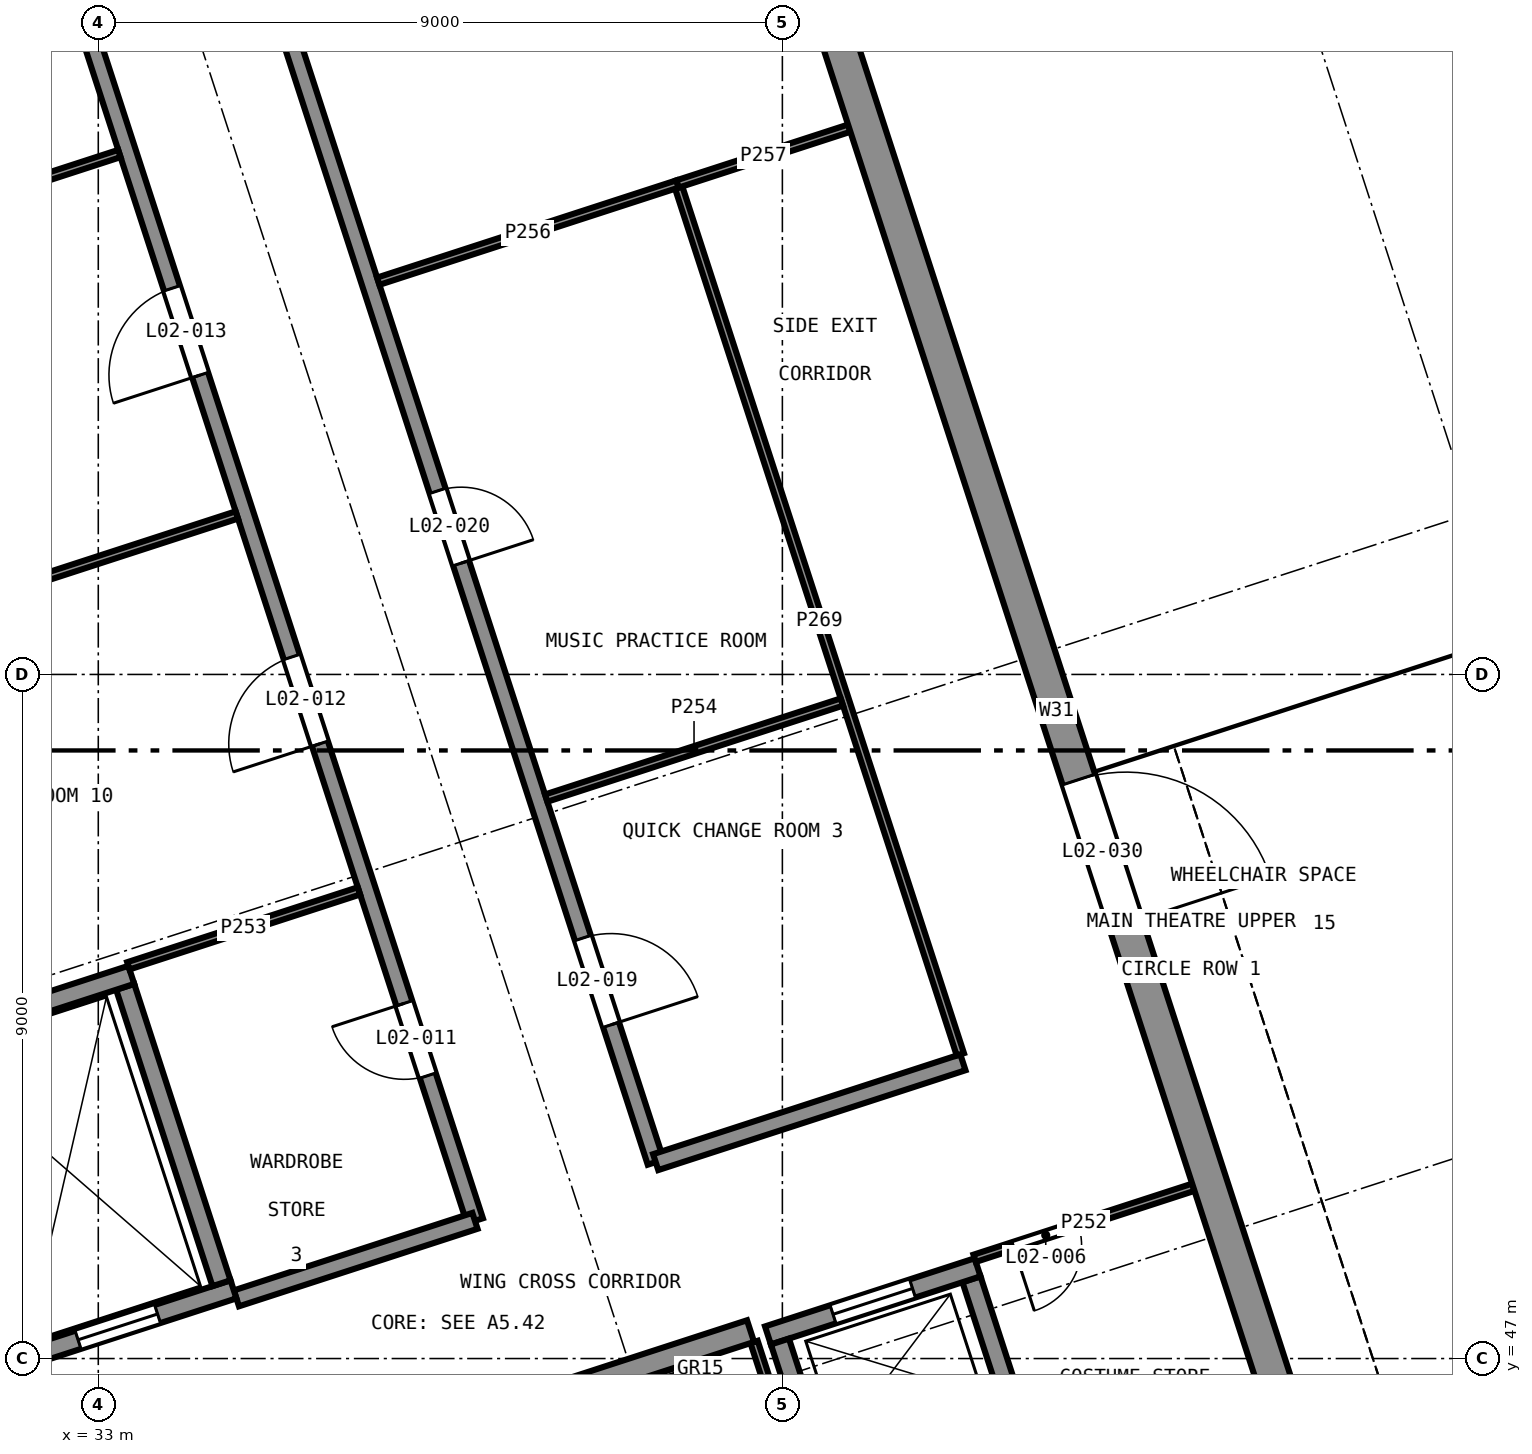
"""IFC4 building model, lengths in metres.
Left out: names, types, materials, properties, quantities, classifications, styles, units other than length and angle.
Written with IfcOpenShell. Run it as: python <this file> out.ifc"""

import sys

from ifc_helpers import new_model, si_unit, direction, frame, frame_2d, origin, place, context, subcontext, project, spatial, rectangle, extrude, element, fill, save


model = new_model("IFC4")
c1 = context("Model", 3, precision=1e-05, world=origin(), true_north=direction((0.0, 1.0)))
c2 = subcontext(c1, "Body", "Model", "MODEL_VIEW")
j1 = project(units=[si_unit("LENGTHUNIT", "METRE"), si_unit("PLANEANGLEUNIT", "RADIAN")], contexts=[c1])
p1 = place(None, origin())
s1 = spatial("IfcSite", under=j1, at=p1, CompositionType="ELEMENT")
p2 = place(p1, origin())
s2 = spatial("IfcBuilding", under=s1, at=p2, CompositionType="ELEMENT")
p3 = place(p2, frame((0.0, 0.0, 9.5)))
s3 = spatial("IfcBuildingStorey", under=s2, at=p3, CompositionType="ELEMENT", Elevation=9.5)
p4 = place(p3, frame((49.786, 41.93, 0.0), z_axis=(0.0, 0.0, 1.0), x_axis=(0.951055937194, 0.309018776661, 0.0)))
e1 = element("IfcWall", 1, at=p4, inside=s3, PredefinedType="SHEAR", context=c2, shape_type="SweptSolid", body=[
    extrude(rectangle(XDim=29.45, YDim=0.45, at=frame_2d((14.725, 0.0))), origin(), (0.0, 0.0, 1.0), 4.0),
])
p5 = place(p3, frame((49.93, 42.214, 0.0), z_axis=(0.0, 0.0, 1.0), x_axis=(-0.309016215614, 0.95105676933, 0.0)))
e2 = element("IfcWall", 2, at=p5, inside=s3, PredefinedType="SHEAR", context=c2, shape_type="SweptSolid", body=[
    extrude(rectangle(XDim=27.975, YDim=0.45, at=frame_2d((13.988, 0.0))), origin(), (0.0, 0.0, 1.0), 4.0),
])
p6 = place(p5, frame((11.042, 0.0, 0.0)))
e3 = element("IfcOpeningElement", 3, at=p6, cuts=e2, PredefinedType="OPENING", context=c2, shape_type="SweptSolid", body=[
    extrude(rectangle(XDim=2.0, YDim=2.4, at=frame_2d((1.0, 1.2))), frame((0.0, 0.235, 0.0), z_axis=(0.0, -1.0, 0.0), x_axis=(1.0, 0.0, 0.0)), (0.0, 0.0, 1.0), 0.47),
])
p7 = place(p3, frame((33.501, 41.003, 0.0), z_axis=(0.0, 0.0, 1.0), x_axis=(-0.309017194826, 0.951056451165, 0.0)))
e4 = element("IfcWall", 4, at=p7, inside=s3, PredefinedType="SOLIDWALL", context=c2, shape_type="SweptSolid", body=[
    extrude(rectangle(XDim=53.7, YDim=0.3, at=frame_2d((26.85, 0.0))), origin(), (0.0, 0.0, 1.0), 4.0),
])
p8 = place(p7, frame((21.55, 0.0, 0.9)))
e5 = element("IfcOpeningElement", 5, at=p8, cuts=e4, PredefinedType="OPENING", context=c2, shape_type="SweptSolid", body=[
    extrude(rectangle(XDim=3.6, YDim=2.1, at=frame_2d((1.8, 1.05))), frame((0.0, 0.16, 0.0), z_axis=(0.0, -1.0, 0.0), x_axis=(1.0, 0.0, 0.0)), (0.0, 0.0, 1.0), 0.32),
])
p9 = place(p3, frame((41.581, 47.361, 0.0), z_axis=(0.0, 0.0, 1.0), x_axis=(-0.951058929949, -0.309009565815, 0.0)))
e6 = element("IfcWall", 6, at=p9, inside=s3, PredefinedType="SOLIDWALL", context=c2, shape_type="SweptSolid", body=[
    extrude(rectangle(XDim=6.35, YDim=0.3, at=frame_2d((3.175, 0.0))), origin(), (0.0, 0.0, 1.0), 3.7),
])
p10 = place(p9, frame((4.85, 0.0, 0.0)))
e7 = element("IfcOpeningElement", 7, at=p10, cuts=e6, PredefinedType="OPENING", context=c2, shape_type="SweptSolid", body=[
    extrude(rectangle(XDim=1.0, YDim=2.1, at=frame_2d((0.5, 1.05))), frame((0.0, 0.16, 0.0), z_axis=(0.0, -1.0, 0.0), x_axis=(1.0, 0.0, 0.0)), (0.0, 0.0, 1.0), 0.32),
])
p11 = place(p3, frame((44.982, 46.521, 0.0), z_axis=(0.0, 0.0, 1.0), x_axis=(-0.308986014439, 0.951066581729, 0.0)))
e8 = element("IfcWall", 8, at=p11, inside=s3, PredefinedType="SHEAR", context=c2, shape_type="SweptSolid", body=[
    extrude(rectangle(XDim=1.6, YDim=0.25, at=frame_2d((0.8, 0.0))), origin(), (0.0, 0.0, 1.0), 4.0),
])
p12 = place(p3, frame((44.568, 48.2, 0.0), z_axis=(0.0, 0.0, 1.0), x_axis=(-0.951047059821, -0.309046096893, 0.0)))
e9 = element("IfcWall", 9, at=p12, inside=s3, PredefinedType="SHEAR", context=c2, shape_type="SweptSolid", body=[
    extrude(rectangle(XDim=2.9, YDim=0.25, at=frame_2d((1.45, 0.0))), origin(), (0.0, 0.0, 1.0), 4.0),
])
p13 = place(p12, frame((0.9, 0.0, 0.0)))
e10 = element("IfcOpeningElement", 10, at=p13, cuts=e9, PredefinedType="OPENING", context=c2, shape_type="SweptSolid", body=[
    extrude(rectangle(XDim=1.1, YDim=2.1, at=frame_2d((0.55, 1.05))), frame((0.0, 0.135, 0.0), z_axis=(0.0, -1.0, 0.0), x_axis=(1.0, 0.0, 0.0)), (0.0, 0.0, 1.0), 0.27),
])
p14 = place(p3, frame((41.968, 47.224, 0.0), z_axis=(0.0, 0.0, 1.0), x_axis=(0.308986014439, -0.951066581729, 0.0)))
e11 = element("IfcWall", 11, at=p14, inside=s3, PredefinedType="SHEAR", context=c2, shape_type="SweptSolid", body=[
    extrude(rectangle(XDim=1.6, YDim=0.25, at=frame_2d((0.8, 0.0))), origin(), (0.0, 0.0, 1.0), 4.0),
])
p15 = place(p3, frame((31.735, 46.922, 0.0), z_axis=(0.0, 0.0, 1.0), x_axis=(0.95104415986, 0.309055020985, 0.0)))
e12 = element("IfcWall", 12, at=p15, inside=s3, PredefinedType="SHEAR", context=c2, shape_type="SweptSolid", body=[
    extrude(rectangle(XDim=3.2, YDim=0.25, at=frame_2d((1.6, 0.0))), origin(), (0.0, 0.0, 1.0), 4.0),
])
p16 = place(p15, frame((1.05, 0.0, 0.0)))
e13 = element("IfcOpeningElement", 13, at=p16, cuts=e12, PredefinedType="OPENING", context=c2, shape_type="SweptSolid", body=[
    extrude(rectangle(XDim=1.1, YDim=2.1, at=frame_2d((0.55, 1.05))), frame((0.0, 0.135, 0.0), z_axis=(0.0, -1.0, 0.0), x_axis=(1.0, 0.0, 0.0)), (0.0, 0.0, 1.0), 0.27),
])
p17 = place(p3, frame((34.621, 47.991, 0.0), z_axis=(0.0, 0.0, 1.0), x_axis=(-0.309055103076, 0.951044133184, 0.0)))
e14 = element("IfcWall", 14, at=p17, inside=s3, PredefinedType="SHEAR", context=c2, shape_type="SweptSolid", body=[
    extrude(rectangle(XDim=4.1, YDim=0.25, at=frame_2d((2.05, 0.0))), origin(), (0.0, 0.0, 1.0), 4.0),
])
p18 = place(p3, frame((33.434, 52.048, 0.0), z_axis=(0.0, 0.0, 1.0), x_axis=(-0.951066581729, -0.308986014439, 0.0)))
e15 = element("IfcWall", 15, at=p18, inside=s3, PredefinedType="SHEAR", context=c2, shape_type="SweptSolid", body=[
    extrude(rectangle(XDim=3.2, YDim=0.25, at=frame_2d((1.6, 0.0))), origin(), (0.0, 0.0, 1.0), 4.0),
])
p19 = place(p3, frame((37.956, 48.812, 0.0), z_axis=(0.0, 0.0, 1.0), x_axis=(-0.30901736393, 0.951056396219, 0.0)))
e16 = element("IfcWall", 16, at=p19, inside=s3, PredefinedType="SOLIDWALL", context=c2, shape_type="SweptSolid", body=[
    extrude(rectangle(XDim=41.7, YDim=0.22, at=frame_2d((20.85, 0.0))), origin(), (0.0, 0.0, 1.0), 3.7),
])
p20 = place(p19, frame((2.009, 0.0, 0.0)))
e17 = element("IfcOpeningElement", 17, at=p20, cuts=e16, PredefinedType="OPENING", context=c2, shape_type="SweptSolid", body=[
    extrude(rectangle(XDim=1.0, YDim=2.1, at=frame_2d((0.5, 1.05))), frame((0.0, 0.12, 0.0), z_axis=(0.0, -1.0, 0.0), x_axis=(1.0, 0.0, 0.0)), (0.0, 0.0, 1.0), 0.24),
])
p21 = place(p19, frame((6.6, 0.0, 0.0)))
e18 = element("IfcOpeningElement", 18, at=p21, cuts=e16, PredefinedType="OPENING", context=c2, shape_type="SweptSolid", body=[
    extrude(rectangle(XDim=1.2, YDim=2.1, at=frame_2d((0.6, 1.05))), frame((0.0, 0.12, 0.0), z_axis=(0.0, -1.0, 0.0), x_axis=(1.0, 0.0, 0.0)), (0.0, 0.0, 1.0), 0.24),
])
p22 = place(p19, frame((11.7, 0.0, 0.0)))
e19 = element("IfcOpeningElement", 19, at=p22, cuts=e16, PredefinedType="OPENING", context=c2, shape_type="SweptSolid", body=[
    extrude(rectangle(XDim=1.2, YDim=2.1, at=frame_2d((0.6, 1.05))), frame((0.0, 0.12, 0.0), z_axis=(0.0, -1.0, 0.0), x_axis=(1.0, 0.0, 0.0)), (0.0, 0.0, 1.0), 0.24),
])
p23 = place(p19, frame((16.7, 0.0, 0.0)))
e20 = element("IfcOpeningElement", 20, at=p23, cuts=e16, PredefinedType="OPENING", context=c2, shape_type="SweptSolid", body=[
    extrude(rectangle(XDim=1.2, YDim=2.1, at=frame_2d((0.6, 1.05))), frame((0.0, 0.12, 0.0), z_axis=(0.0, -1.0, 0.0), x_axis=(1.0, 0.0, 0.0)), (0.0, 0.0, 1.0), 0.24),
])
p24 = place(p19, frame((21.7, 0.0, 0.0)))
e21 = element("IfcOpeningElement", 21, at=p24, cuts=e16, PredefinedType="OPENING", context=c2, shape_type="SweptSolid", body=[
    extrude(rectangle(XDim=1.2, YDim=2.1, at=frame_2d((0.6, 1.05))), frame((0.0, 0.12, 0.0), z_axis=(0.0, -1.0, 0.0), x_axis=(1.0, 0.0, 0.0)), (0.0, 0.0, 1.0), 0.24),
])
p25 = place(p19, frame((26.7, 0.0, 0.0)))
e22 = element("IfcOpeningElement", 22, at=p25, cuts=e16, PredefinedType="OPENING", context=c2, shape_type="SweptSolid", body=[
    extrude(rectangle(XDim=1.2, YDim=2.1, at=frame_2d((0.6, 1.05))), frame((0.0, 0.12, 0.0), z_axis=(0.0, -1.0, 0.0), x_axis=(1.0, 0.0, 0.0)), (0.0, 0.0, 1.0), 0.24),
])
p26 = place(p19, frame((31.739, 0.0, 0.0)))
e23 = element("IfcOpeningElement", 23, at=p26, cuts=e16, PredefinedType="OPENING", context=c2, shape_type="SweptSolid", body=[
    extrude(rectangle(XDim=1.2, YDim=2.1, at=frame_2d((0.6, 1.05))), frame((0.0, 0.12, 0.0), z_axis=(0.0, -1.0, 0.0), x_axis=(1.0, 0.0, 0.0)), (0.0, 0.0, 1.0), 0.24),
])
p27 = place(p3, frame((40.333, 49.584, 0.0), z_axis=(0.0, 0.0, 1.0), x_axis=(-0.309015643281, 0.951056955291, 0.0)))
e24 = element("IfcWall", 24, at=p27, inside=s3, PredefinedType="SOLIDWALL", context=c2, shape_type="SweptSolid", body=[
    extrude(rectangle(XDim=41.7, YDim=0.22, at=frame_2d((20.85, 0.0))), origin(), (0.0, 0.0, 1.0), 3.7),
])
p28 = place(p27, frame((1.9, 0.0, 0.0)))
e25 = element("IfcOpeningElement", 25, at=p28, cuts=e24, PredefinedType="OPENING", context=c2, shape_type="SweptSolid", body=[
    extrude(rectangle(XDim=1.2, YDim=2.1, at=frame_2d((0.6, 1.05))), frame((0.0, 0.12, 0.0), z_axis=(0.0, -1.0, 0.0), x_axis=(1.0, 0.0, 0.0)), (0.0, 0.0, 1.0), 0.24),
])
p29 = place(p27, frame((8.285, 0.0, 0.0)))
e26 = element("IfcOpeningElement", 26, at=p29, cuts=e24, PredefinedType="OPENING", context=c2, shape_type="SweptSolid", body=[
    extrude(rectangle(XDim=1.0, YDim=2.1, at=frame_2d((0.5, 1.05))), frame((0.0, 0.12, 0.0), z_axis=(0.0, -1.0, 0.0), x_axis=(1.0, 0.0, 0.0)), (0.0, 0.0, 1.0), 0.24),
])
p30 = place(p27, frame((16.475, 0.0, 0.0)))
e27 = element("IfcOpeningElement", 27, at=p30, cuts=e24, PredefinedType="OPENING", context=c2, shape_type="SweptSolid", body=[
    extrude(rectangle(XDim=1.0, YDim=2.1, at=frame_2d((0.5, 1.05))), frame((0.0, 0.12, 0.0), z_axis=(0.0, -1.0, 0.0), x_axis=(1.0, 0.0, 0.0)), (0.0, 0.0, 1.0), 0.24),
])
p31 = place(p27, frame((25.752, 0.0, 0.0)))
e28 = element("IfcOpeningElement", 28, at=p31, cuts=e24, PredefinedType="OPENING", context=c2, shape_type="SweptSolid", body=[
    extrude(rectangle(XDim=1.0, YDim=2.1, at=frame_2d((0.5, 1.05))), frame((0.0, 0.12, 0.0), z_axis=(0.0, -1.0, 0.0), x_axis=(1.0, 0.0, 0.0)), (0.0, 0.0, 1.0), 0.24),
])
p32 = place(p27, frame((32.761, 0.0, 0.0)))
e29 = element("IfcOpeningElement", 29, at=p32, cuts=e24, PredefinedType="OPENING", context=c2, shape_type="SweptSolid", body=[
    extrude(rectangle(XDim=1.0, YDim=2.1, at=frame_2d((0.5, 1.05))), frame((0.0, 0.12, 0.0), z_axis=(0.0, -1.0, 0.0), x_axis=(1.0, 0.0, 0.0)), (0.0, 0.0, 1.0), 0.24),
])
p33 = place(p3, frame((34.817, 47.792, 0.0), z_axis=(0.0, 0.0, 1.0), x_axis=(0.951053095941, 0.309027520945, 0.0)))
e30 = element("IfcWall", 30, at=p33, inside=s3, PredefinedType="SOLIDWALL", context=c2, shape_type="SweptSolid", body=[
    extrude(rectangle(XDim=3.3, YDim=0.22, at=frame_2d((1.65, 0.0))), origin(), (0.0, 0.0, 1.0), 3.7),
])
p34 = place(p3, frame((40.333, 49.584, 0.0), z_axis=(0.0, 0.0, 1.0), x_axis=(0.951062770994, 0.308997743729, 0.0)))
e31 = element("IfcWall", 31, at=p34, inside=s3, PredefinedType="SOLIDWALL", context=c2, shape_type="SweptSolid", body=[
    extrude(rectangle(XDim=4.25, YDim=0.22, at=frame_2d((2.125, 0.0))), origin(), (0.0, 0.0, 1.0), 3.7),
])
p35 = place(p3, frame((44.53, 48.319, 0.0), z_axis=(0.0, 0.0, 1.0), x_axis=(0.951053046121, 0.30902767427, 0.0)))
e32 = element("IfcWall", 32, at=p35, inside=s3, PredefinedType="PARTITIONING", context=c2, shape_type="SweptSolid", body=[
    extrude(rectangle(XDim=3.025, YDim=0.1, at=frame_2d((1.512, 0.0))), origin(), (0.0, 0.0, 1.0), 3.7),
])
p36 = place(p35, frame((0.533, 0.0, 0.0)))
e33 = element("IfcOpeningElement", 33, at=p36, cuts=e32, PredefinedType="OPENING", context=c2, shape_type="SweptSolid", body=[
    extrude(rectangle(XDim=0.9, YDim=2.1, at=frame_2d((0.45, 1.05))), frame((0.0, 0.06, 0.0), z_axis=(0.0, -1.0, 0.0), x_axis=(1.0, 0.0, 0.0)), (0.0, 0.0, 1.0), 0.12),
])
p37 = place(p3, frame((33.396, 52.167, 0.0), z_axis=(0.0, 0.0, 1.0), x_axis=(0.951044192343, 0.309054921027, 0.0)))
e34 = element("IfcWall", 34, at=p37, inside=s3, PredefinedType="PARTITIONING", context=c2, shape_type="SweptSolid", body=[
    extrude(rectangle(XDim=3.19, YDim=0.1, at=frame_2d((1.595, 0.0))), origin(), (0.0, 0.0, 1.0), 3.7),
])
p38 = place(p3, frame((38.893, 54.373, 0.0), z_axis=(0.0, 0.0, 1.0), x_axis=(0.951055560564, 0.309019935796, 0.0)))
e35 = element("IfcWall", 35, at=p38, inside=s3, PredefinedType="PARTITIONING", context=c2, shape_type="SweptSolid", body=[
    extrude(rectangle(XDim=4.09, YDim=0.1, at=frame_2d((2.045, 0.0))), origin(), (0.0, 0.0, 1.0), 3.7),
])
p39 = place(p3, frame((28.745, 56.123, 0.0), z_axis=(0.0, 0.0, 1.0), x_axis=(0.951059053869, 0.309009184417, 0.0)))
e36 = element("IfcWall", 36, at=p39, inside=s3, PredefinedType="PARTITIONING", context=c2, shape_type="SweptSolid", body=[
    extrude(rectangle(XDim=6.39, YDim=0.1, at=frame_2d((3.195, 0.0))), origin(), (0.0, 0.0, 1.0), 3.7),
])
p40 = place(p3, frame((36.683, 61.173, 0.0), z_axis=(0.0, 0.0, 1.0), x_axis=(0.95105616864, 0.309018064344, 0.0)))
e37 = element("IfcWall", 37, at=p40, inside=s3, PredefinedType="PARTITIONING", context=c2, shape_type="SweptSolid", body=[
    extrude(rectangle(XDim=4.14, YDim=0.1, at=frame_2d((2.07, 0.0))), origin(), (0.0, 0.0, 1.0), 3.7),
])
p41 = place(p3, frame((40.621, 62.453, 0.0), z_axis=(0.0, 0.0, 1.0), x_axis=(0.951061260164, 0.309002393867, 0.0)))
e38 = element("IfcWall", 38, at=p41, inside=s3, PredefinedType="PARTITIONING", context=c2, shape_type="SweptSolid", body=[
    extrude(rectangle(XDim=2.375, YDim=0.1, at=frame_2d((1.188, 0.0))), origin(), (0.0, 0.0, 1.0), 3.7),
])
p42 = place(p3, frame((27.2, 60.878, 0.0), z_axis=(0.0, 0.0, 1.0), x_axis=(0.951055405517, 0.309020412977, 0.0)))
e39 = element("IfcWall", 39, at=p42, inside=s3, PredefinedType="PARTITIONING", context=c2, shape_type="SweptSolid", body=[
    extrude(rectangle(XDim=6.39, YDim=0.1, at=frame_2d((3.195, 0.0))), origin(), (0.0, 0.0, 1.0), 3.7),
])
p43 = place(p3, frame((42.678, 43.985, 0.0), z_axis=(0.0, 0.0, 1.0), x_axis=(-0.309045481752, 0.951047259714, 0.0)))
e40 = element("IfcWall", 40, at=p43, inside=s3, PredefinedType="PARTITIONING", context=c2, shape_type="SweptSolid", body=[
    extrude(rectangle(XDim=3.4, YDim=0.1, at=frame_2d((1.7, 0.0))), origin(), (0.0, 0.0, 1.0), 3.7),
])
p44 = place(p3, frame((44.341, 51.002, 0.0), z_axis=(0.0, 0.0, 1.0), x_axis=(-0.309016547708, 0.951056661426, 0.0)))
e41 = element("IfcWall", 41, at=p44, inside=s3, PredefinedType="PARTITIONING", context=c2, shape_type="SweptSolid", body=[
    extrude(rectangle(XDim=11.99, YDim=0.1, at=frame_2d((5.995, 0.0))), origin(), (0.0, 0.0, 1.0), 3.7),
])
p45 = place(p13, origin())
e42 = element("IfcDoor", 42, at=p45, inside=s3, OperationType="SLIDING_TO_LEFT", PredefinedType="DOOR", context=c2, shape_type="SweptSolid", body=[
    extrude(rectangle(XDim=1.1, YDim=2.1, at=frame_2d((0.55, 1.05))), frame((0.0, 0.025, 0.0), z_axis=(0.0, -1.0, 0.0), x_axis=(1.0, 0.0, 0.0)), (0.0, 0.0, 1.0), 0.05),
])
fill(e10, e42)
p46 = place(p16, origin())
e43 = element("IfcDoor", 43, at=p46, inside=s3, OperationType="SLIDING_TO_LEFT", PredefinedType="DOOR", context=c2, shape_type="SweptSolid", body=[
    extrude(rectangle(XDim=1.1, YDim=2.1, at=frame_2d((0.55, 1.05))), frame((0.0, 0.025, 0.0), z_axis=(0.0, -1.0, 0.0), x_axis=(1.0, 0.0, 0.0)), (0.0, 0.0, 1.0), 0.05),
])
fill(e13, e43)
p47 = place(p36, frame((0.9, 0.0, 0.0), z_axis=(0.0, 0.0, 1.0), x_axis=(-1.0, 0.0, 0.0)))
e44 = element("IfcDoor", 44, at=p47, inside=s3, OperationType="SINGLE_SWING_LEFT", PredefinedType="DOOR", context=c2, shape_type="SweptSolid", body=[
    extrude(rectangle(XDim=0.9, YDim=2.1, at=frame_2d((0.45, 1.05))), frame((0.0, 0.025, 0.0), z_axis=(0.0, -1.0, 0.0), x_axis=(1.0, 0.0, 0.0)), (0.0, 0.0, 1.0), 0.05),
])
fill(e33, e44)
p48 = place(p20, origin())
e45 = element("IfcDoor", 45, at=p48, inside=s3, OperationType="SINGLE_SWING_LEFT", PredefinedType="DOOR", context=c2, shape_type="SweptSolid", body=[
    extrude(rectangle(XDim=1.0, YDim=2.1, at=frame_2d((0.5, 1.05))), frame((0.0, 0.025, 0.0), z_axis=(0.0, -1.0, 0.0), x_axis=(1.0, 0.0, 0.0)), (0.0, 0.0, 1.0), 0.05),
])
fill(e17, e45)
p49 = place(p21, origin())
e46 = element("IfcDoor", 46, at=p49, inside=s3, OperationType="SINGLE_SWING_RIGHT", PredefinedType="DOOR", context=c2, shape_type="SweptSolid", body=[
    extrude(rectangle(XDim=1.2, YDim=2.1, at=frame_2d((0.6, 1.05))), frame((0.0, 0.025, 0.0), z_axis=(0.0, -1.0, 0.0), x_axis=(1.0, 0.0, 0.0)), (0.0, 0.0, 1.0), 0.05),
])
fill(e18, e46)
p50 = place(p22, origin())
e47 = element("IfcDoor", 47, at=p50, inside=s3, OperationType="SINGLE_SWING_RIGHT", PredefinedType="DOOR", context=c2, shape_type="SweptSolid", body=[
    extrude(rectangle(XDim=1.2, YDim=2.1, at=frame_2d((0.6, 1.05))), frame((0.0, 0.025, 0.0), z_axis=(0.0, -1.0, 0.0), x_axis=(1.0, 0.0, 0.0)), (0.0, 0.0, 1.0), 0.05),
])
fill(e19, e47)
p51 = place(p28, frame((1.2, 0.0, 0.0), z_axis=(0.0, 0.0, 1.0), x_axis=(-1.0, 0.0, 0.0)))
e48 = element("IfcDoor", 48, at=p51, inside=s3, OperationType="SINGLE_SWING_LEFT", PredefinedType="DOOR", context=c2, shape_type="SweptSolid", body=[
    extrude(rectangle(XDim=1.2, YDim=2.1, at=frame_2d((0.6, 1.05))), frame((0.0, 0.025, 0.0), z_axis=(0.0, -1.0, 0.0), x_axis=(1.0, 0.0, 0.0)), (0.0, 0.0, 1.0), 0.05),
])
fill(e25, e48)
p52 = place(p29, frame((1.0, 0.0, 0.0), z_axis=(0.0, 0.0, 1.0), x_axis=(-1.0, 0.0, 0.0)))
e49 = element("IfcDoor", 49, at=p52, inside=s3, OperationType="SINGLE_SWING_LEFT", PredefinedType="DOOR", context=c2, shape_type="SweptSolid", body=[
    extrude(rectangle(XDim=1.0, YDim=2.1, at=frame_2d((0.5, 1.05))), frame((0.0, 0.025, 0.0), z_axis=(0.0, -1.0, 0.0), x_axis=(1.0, 0.0, 0.0)), (0.0, 0.0, 1.0), 0.05),
])
fill(e26, e49)
p53 = place(p6, frame((2.0, 0.0, 0.0), z_axis=(0.0, 0.0, 1.0), x_axis=(-1.0, 0.0, 0.0)))
e50 = element("IfcDoor", 50, at=p53, inside=s3, OperationType="DOUBLE_DOOR_SINGLE_SWING", PredefinedType="DOOR", context=c2, shape_type="SweptSolid", body=[
    extrude(rectangle(XDim=2.0, YDim=2.4, at=frame_2d((1.0, 1.2))), frame((0.0, 0.025, 0.0), z_axis=(0.0, -1.0, 0.0), x_axis=(1.0, 0.0, 0.0)), (0.0, 0.0, 1.0), 0.05),
])
fill(e3, e50)
save(model, sys.argv[1])
